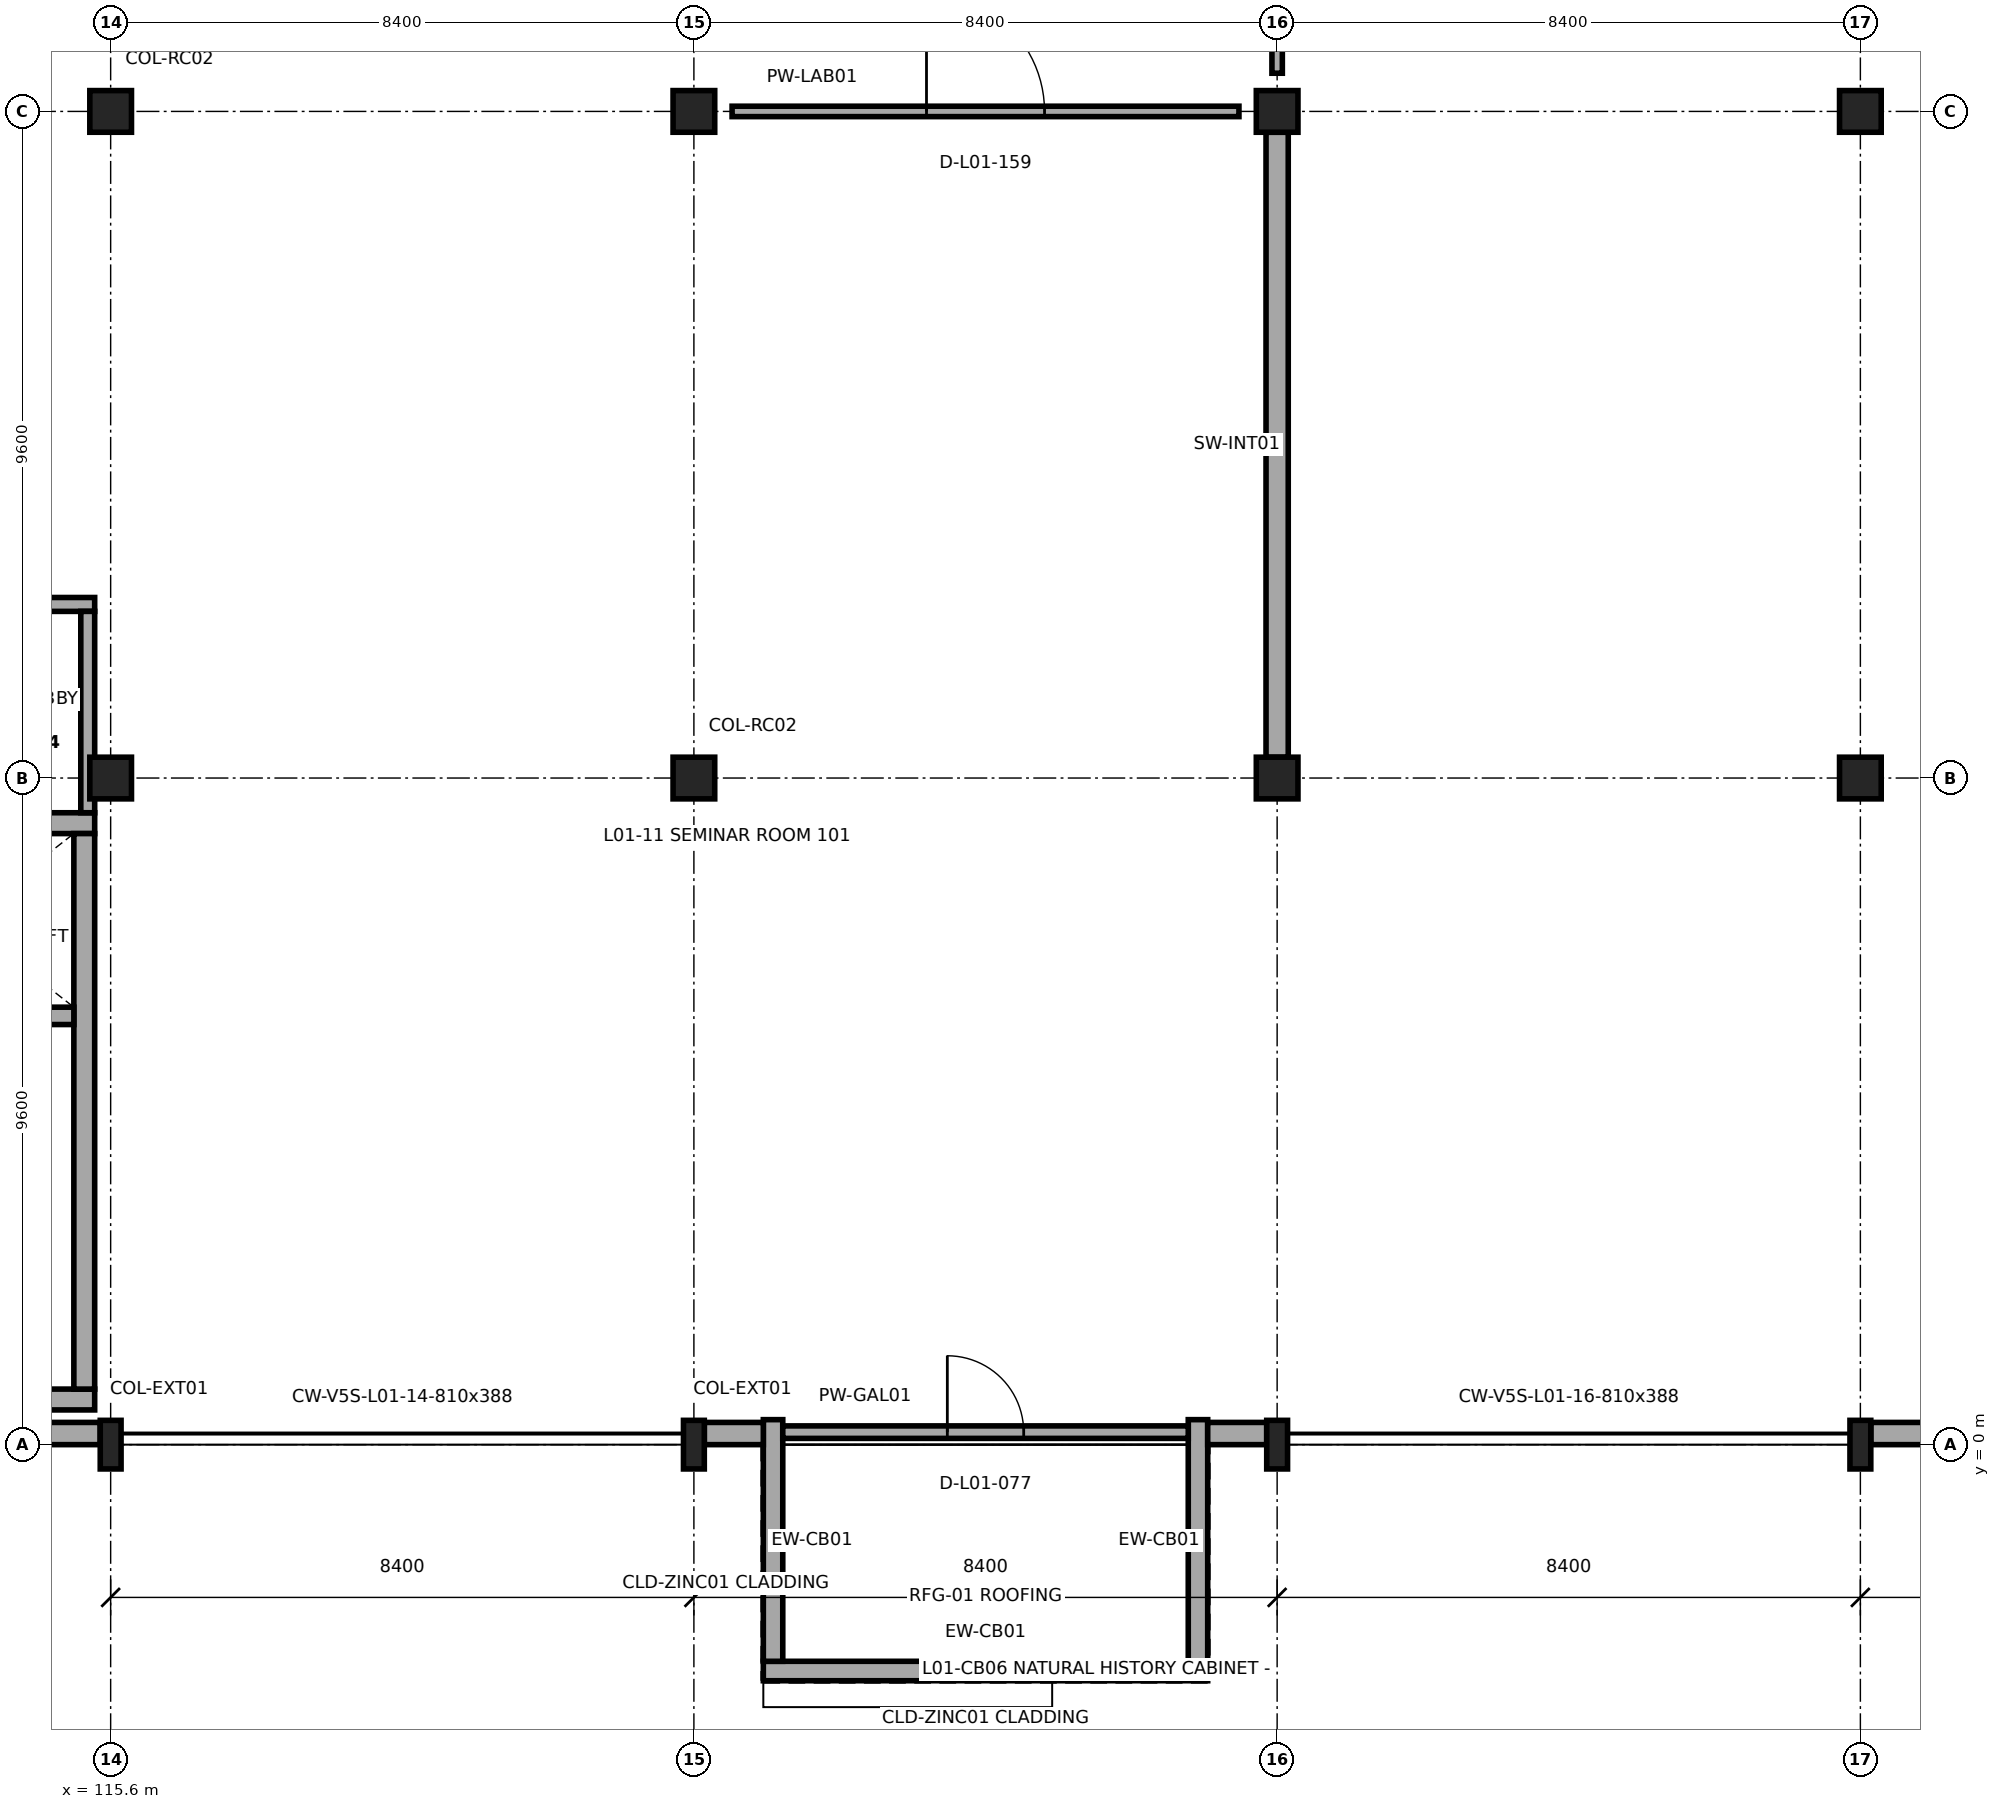
"""IFC4 building model, lengths in metres.
Left out: names, types, materials, properties, quantities, classifications, styles, units other than length and angle.
Written with IfcOpenShell. Run it as: python <this file> out.ifc"""

import sys

from ifc_helpers import new_model, si_unit, direction, frame, frame_2d, origin, origin_2d, place, context, subcontext, project, spatial, rectangle, i_section, extrude, element, fill, save


model = new_model("IFC4")
c1 = context("Model", 3, precision=1e-05, world=origin(), true_north=direction((0.0, 1.0)))
c2 = subcontext(c1, "Body", "Model", "MODEL_VIEW")
j1 = project(units=[si_unit("LENGTHUNIT", "METRE"), si_unit("PLANEANGLEUNIT", "RADIAN")], contexts=[c1])
p1 = place(None, origin())
s1 = spatial("IfcSite", under=j1, at=p1, CompositionType="ELEMENT")
p2 = place(p1, origin())
s2 = spatial("IfcBuilding", under=s1, at=p2, CompositionType="ELEMENT")
p3 = place(p2, frame((0.0, 0.0, 8.4)))
s3 = spatial("IfcBuildingStorey", under=s2, at=p3, CompositionType="ELEMENT", Elevation=8.4)
p4 = place(p3, frame((115.6, 0.0, 0.0), z_axis=(0.0, 0.0, 1.0), x_axis=(1.0, 0.0, 0.0)))
e1 = element("IfcColumn", 1, at=p4, inside=s3, PredefinedType="COLUMN", context=c2, shape_type="SweptSolid", body=[
    extrude(i_section(OverallWidth=0.3, OverallDepth=0.7, WebThickness=0.017, FlangeThickness=0.032, FilletRadius=0.027, at=origin_2d()), origin(), (0.0, 0.0, 1.0), 4.5),
])
for number, where, z_axis, x_axis in (
    (2, (115.6, 9.6, 0.0), (0.0, 0.0, 1.0), (1.0, 0.0, 0.0)),
    (3, (115.6, 19.2, 0.0), (0.0, 0.0, 1.0), (1.0, 0.0, 0.0)),
):
    element("IfcColumn", number, at=place(p3, frame(where, z_axis=z_axis, x_axis=x_axis)), inside=s3, PredefinedType="COLUMN", context=c2, shape_type="SweptSolid", body=[
        extrude(rectangle(XDim=0.6, YDim=0.6, at=origin_2d()), origin(), (0.0, 0.0, 1.0), 4.5),
    ])
p5 = place(p3, frame((124.0, 0.0, 0.0), z_axis=(0.0, 0.0, 1.0), x_axis=(1.0, 0.0, 0.0)))
e4 = element("IfcColumn", 4, at=p5, inside=s3, PredefinedType="COLUMN", context=c2, shape_type="SweptSolid", body=[
    extrude(i_section(OverallWidth=0.3, OverallDepth=0.7, WebThickness=0.017, FlangeThickness=0.032, FilletRadius=0.027, at=origin_2d()), origin(), (0.0, 0.0, 1.0), 4.5),
])
for number, where, z_axis, x_axis in (
    (5, (124.0, 9.6, 0.0), (0.0, 0.0, 1.0), (1.0, 0.0, 0.0)),
    (6, (124.0, 19.2, 0.0), (0.0, 0.0, 1.0), (1.0, 0.0, 0.0)),
):
    element("IfcColumn", number, at=place(p3, frame(where, z_axis=z_axis, x_axis=x_axis)), inside=s3, PredefinedType="COLUMN", context=c2, shape_type="SweptSolid", body=[
        extrude(rectangle(XDim=0.6, YDim=0.6, at=origin_2d()), origin(), (0.0, 0.0, 1.0), 4.5),
    ])
p6 = place(p3, frame((132.4, 0.0, 0.0), z_axis=(0.0, 0.0, 1.0), x_axis=(1.0, 0.0, 0.0)))
e7 = element("IfcColumn", 7, at=p6, inside=s3, PredefinedType="COLUMN", context=c2, shape_type="SweptSolid", body=[
    extrude(i_section(OverallWidth=0.3, OverallDepth=0.7, WebThickness=0.017, FlangeThickness=0.032, FilletRadius=0.027, at=origin_2d()), origin(), (0.0, 0.0, 1.0), 4.5),
])
for number, where, z_axis, x_axis in (
    (8, (132.4, 9.6, 0.0), (0.0, 0.0, 1.0), (1.0, 0.0, 0.0)),
    (9, (132.4, 19.2, 0.0), (0.0, 0.0, 1.0), (1.0, 0.0, 0.0)),
):
    element("IfcColumn", number, at=place(p3, frame(where, z_axis=z_axis, x_axis=x_axis)), inside=s3, PredefinedType="COLUMN", context=c2, shape_type="SweptSolid", body=[
        extrude(rectangle(XDim=0.6, YDim=0.6, at=origin_2d()), origin(), (0.0, 0.0, 1.0), 4.5),
    ])
p7 = place(p3, frame((140.8, 0.0, 0.0), z_axis=(0.0, 0.0, 1.0), x_axis=(1.0, 0.0, 0.0)))
e10 = element("IfcColumn", 10, at=p7, inside=s3, PredefinedType="COLUMN", context=c2, shape_type="SweptSolid", body=[
    extrude(i_section(OverallWidth=0.3, OverallDepth=0.7, WebThickness=0.017, FlangeThickness=0.032, FilletRadius=0.027, at=origin_2d()), origin(), (0.0, 0.0, 1.0), 4.5),
])
for number, where, z_axis, x_axis in (
    (11, (140.8, 9.6, 0.0), (0.0, 0.0, 1.0), (1.0, 0.0, 0.0)),
    (12, (140.8, 19.2, 0.0), (0.0, 0.0, 1.0), (1.0, 0.0, 0.0)),
):
    element("IfcColumn", number, at=place(p3, frame(where, z_axis=z_axis, x_axis=x_axis)), inside=s3, PredefinedType="COLUMN", context=c2, shape_type="SweptSolid", body=[
        extrude(rectangle(XDim=0.6, YDim=0.6, at=origin_2d()), origin(), (0.0, 0.0, 1.0), 4.5),
    ])
p8 = place(p3, frame((125.0, -3.26, 0.0), z_axis=(0.0, 0.0, 1.0), x_axis=(1.0, 0.0, 0.0)))
e13 = element("IfcWall", 13, at=p8, inside=s3, PredefinedType="SOLIDWALL", context=c2, shape_type="SweptSolid", body=[
    extrude(rectangle(XDim=6.4, YDim=0.28, at=frame_2d((3.2, 0.0))), origin(), (0.0, 0.0, 1.0), 2.99),
])
for number, where, z_axis, x_axis in (
    (14, (125.14, 0.36, 0.0), (0.0, 0.0, 1.0), (0.0, -1.0, 0.0)),
    (15, (131.26, -3.12, 0.0), (0.0, 0.0, 1.0), (0.0, 1.0, 0.0)),
):
    element("IfcWall", number, at=place(p3, frame(where, z_axis=z_axis, x_axis=x_axis)), inside=s3, PredefinedType="SOLIDWALL", context=c2, shape_type="SweptSolid", body=[
        extrude(rectangle(XDim=3.48, YDim=0.28, at=frame_2d((1.74, 0.0))), origin(), (0.0, 0.0, 1.0), 2.99),
    ])
p9 = place(p3, frame((107.625, 0.16, 0.0), z_axis=(0.0, 0.0, 1.0), x_axis=(1.0, 0.0, 0.0)))
e16 = element("IfcWall", 16, at=p9, inside=s3, PredefinedType="SOLIDWALL", context=c2, shape_type="SweptSolid", body=[
    extrude(rectangle(XDim=7.825, YDim=0.32, at=frame_2d((3.913, 0.0))), origin(), (0.0, 0.0, 1.0), 3.02),
])
for number, where, z_axis, x_axis in (
    (17, (124.15, 0.16, 0.0), (0.0, 0.0, 1.0), (1.0, 0.0, 0.0)),
    (18, (131.4, 0.16, 0.0), (0.0, 0.0, 1.0), (1.0, 0.0, 0.0)),
):
    element("IfcWall", number, at=place(p3, frame(where, z_axis=z_axis, x_axis=x_axis)), inside=s3, PredefinedType="SOLIDWALL", context=c2, shape_type="SweptSolid", body=[
        extrude(rectangle(XDim=0.85, YDim=0.32, at=frame_2d((0.425, 0.0))), origin(), (0.0, 0.0, 1.0), 3.88),
    ])
p10 = place(p3, frame((140.95, 0.16, 0.0), z_axis=(0.0, 0.0, 1.0), x_axis=(1.0, 0.0, 0.0)))
e19 = element("IfcWall", 19, at=p10, inside=s3, PredefinedType="SOLIDWALL", context=c2, shape_type="SweptSolid", body=[
    extrude(rectangle(XDim=8.1, YDim=0.32, at=frame_2d((4.05, 0.0))), origin(), (0.0, 0.0, 1.0), 3.88),
])
p11 = place(p10, frame((3.425, 0.0, 1.0)))
e20 = element("IfcOpeningElement", 20, at=p11, cuts=e19, PredefinedType="OPENING", context=c2, shape_type="SweptSolid", body=[
    extrude(rectangle(XDim=1.25, YDim=1.95, at=frame_2d((0.625, 0.975))), frame((0.0, 0.17, 0.0), z_axis=(0.0, -1.0, 0.0), x_axis=(1.0, 0.0, 0.0)), (0.0, 0.0, 1.0), 0.34),
])
p12 = place(p3, frame((107.43, 0.65, 0.0), z_axis=(0.0, 0.0, 1.0), x_axis=(1.0, 0.0, 0.0)))
e21 = element("IfcWall", 21, at=p12, inside=s3, PredefinedType="SHEAR", context=c2, shape_type="SweptSolid", body=[
    extrude(rectangle(XDim=7.94, YDim=0.3, at=frame_2d((3.97, 0.0))), origin(), (0.0, 0.0, 1.0), 4.25),
])
p13 = place(p3, frame((115.37, 8.95, 0.0), z_axis=(0.0, 0.0, 1.0), x_axis=(-1.0, 0.0, 0.0)))
e22 = element("IfcWall", 22, at=p13, inside=s3, PredefinedType="SHEAR", context=c2, shape_type="SweptSolid", body=[
    extrude(rectangle(XDim=7.94, YDim=0.3, at=frame_2d((3.97, 0.0))), origin(), (0.0, 0.0, 1.0), 4.25),
])
p14 = place(p13, frame((5.17, 0.0, 0.0)))
e23 = element("IfcOpeningElement", 23, at=p14, cuts=e22, PredefinedType="OPENING", context=c2, shape_type="SweptSolid", body=[
    extrude(rectangle(XDim=1.1, YDim=2.2, at=frame_2d((0.55, 1.1))), frame((0.0, 0.16, 0.0), z_axis=(0.0, -1.0, 0.0), x_axis=(1.0, 0.0, 0.0)), (0.0, 0.0, 1.0), 0.32),
])
p15 = place(p13, frame((1.35, 0.0, 0.0)))
e24 = element("IfcOpeningElement", 24, at=p15, cuts=e22, PredefinedType="OPENING", context=c2, shape_type="SweptSolid", body=[
    extrude(rectangle(XDim=1.1, YDim=2.1, at=frame_2d((0.55, 1.05))), frame((0.0, 0.16, 0.0), z_axis=(0.0, -1.0, 0.0), x_axis=(1.0, 0.0, 0.0)), (0.0, 0.0, 1.0), 0.32),
])
p16 = place(p3, frame((115.22, 0.8, 0.0), z_axis=(0.0, 0.0, 1.0), x_axis=(0.0, 1.0, 0.0)))
e25 = element("IfcWall", 25, at=p16, inside=s3, PredefinedType="SHEAR", context=c2, shape_type="SweptSolid", body=[
    extrude(rectangle(XDim=8.0, YDim=0.3, at=frame_2d((4.0, 0.0))), origin(), (0.0, 0.0, 1.0), 4.25),
])
p17 = place(p3, frame((111.87, 6.175, 0.0), z_axis=(0.0, 0.0, 1.0), x_axis=(1.0, 0.0, 0.0)))
e26 = element("IfcWall", 26, at=p17, inside=s3, PredefinedType="SHEAR", context=c2, shape_type="SweptSolid", body=[
    extrude(rectangle(XDim=3.2, YDim=0.25, at=frame_2d((1.6, 0.0))), origin(), (0.0, 0.0, 1.0), 4.25),
])
p18 = place(p3, frame((107.43, 12.1, 0.0), z_axis=(0.0, 0.0, 1.0), x_axis=(1.0, 0.0, 0.0)))
e27 = element("IfcWall", 27, at=p18, inside=s3, PredefinedType="SOLIDWALL", context=c2, shape_type="SweptSolid", body=[
    extrude(rectangle(XDim=7.94, YDim=0.2, at=frame_2d((3.97, 0.0))), origin(), (0.0, 0.0, 1.0), 3.682),
])
p19 = place(p18, frame((3.07, 0.0, 0.0)))
e28 = element("IfcOpeningElement", 28, at=p19, cuts=e27, PredefinedType="OPENING", context=c2, shape_type="SweptSolid", body=[
    extrude(rectangle(XDim=1.8, YDim=2.2, at=frame_2d((0.9, 1.1))), frame((0.0, 0.11, 0.0), z_axis=(0.0, -1.0, 0.0), x_axis=(1.0, 0.0, 0.0)), (0.0, 0.0, 1.0), 0.22),
])
p20 = place(p3, frame((115.27, 12.0, 0.0), z_axis=(0.0, 0.0, 1.0), x_axis=(0.0, -1.0, 0.0)))
e29 = element("IfcWall", 29, at=p20, inside=s3, PredefinedType="SOLIDWALL", context=c2, shape_type="SweptSolid", body=[
    extrude(rectangle(XDim=2.9, YDim=0.2, at=frame_2d((1.45, 0.0))), origin(), (0.0, 0.0, 1.0), 3.682),
])
p21 = place(p3, frame((132.4, 9.9, 0.0), z_axis=(0.0, 0.0, 1.0), x_axis=(0.0, 1.0, 0.0)))
e30 = element("IfcWall", 30, at=p21, inside=s3, PredefinedType="SHEAR", context=c2, shape_type="SweptSolid", body=[
    extrude(rectangle(XDim=9.0, YDim=0.32, at=frame_2d((4.5, 0.0))), origin(), (0.0, 0.0, 1.0), 4.25),
])
p22 = place(p3, frame((125.28, 0.18, 0.0), z_axis=(0.0, 0.0, 1.0), x_axis=(1.0, 0.0, 0.0)))
e31 = element("IfcWall", 31, at=p22, inside=s3, PredefinedType="PARTITIONING", context=c2, shape_type="SweptSolid", body=[
    extrude(rectangle(XDim=5.84, YDim=0.18, at=frame_2d((2.92, 0.0))), origin(), (0.0, 0.0, 1.0), 2.99),
])
p23 = place(p22, frame((2.37, 0.0, 0.0)))
e32 = element("IfcOpeningElement", 32, at=p23, cuts=e31, PredefinedType="OPENING", context=c2, shape_type="SweptSolid", body=[
    extrude(rectangle(XDim=1.1, YDim=2.2, at=frame_2d((0.55, 1.1))), frame((0.0, 0.1, 0.0), z_axis=(0.0, -1.0, 0.0), x_axis=(1.0, 0.0, 0.0)), (0.0, 0.0, 1.0), 0.2),
])
p24 = place(p3, frame((124.55, 19.2, 0.0), z_axis=(0.0, 0.0, 1.0), x_axis=(1.0, 0.0, 0.0)))
e33 = element("IfcWall", 33, at=p24, inside=s3, PredefinedType="PARTITIONING", context=c2, shape_type="SweptSolid", body=[
    extrude(rectangle(XDim=7.3, YDim=0.15, at=frame_2d((3.65, 0.0))), origin(), (0.0, 0.0, 1.0), 3.682),
])
p25 = place(p24, frame((2.8, 0.0, 0.0)))
e34 = element("IfcOpeningElement", 34, at=p25, cuts=e33, PredefinedType="OPENING", context=c2, shape_type="SweptSolid", body=[
    extrude(rectangle(XDim=1.7, YDim=2.35, at=frame_2d((0.85, 1.175))), frame((0.0, 0.085, 0.0), z_axis=(0.0, -1.0, 0.0), x_axis=(1.0, 0.0, 0.0)), (0.0, 0.0, 1.0), 0.17),
])
p26 = place(p3, frame((132.4, 19.75, 0.0), z_axis=(0.0, 0.0, 1.0), x_axis=(0.0, 1.0, 0.0)))
e35 = element("IfcWall", 35, at=p26, inside=s3, PredefinedType="PARTITIONING", context=c2, shape_type="SweptSolid", body=[
    extrude(rectangle(XDim=6.1, YDim=0.15, at=frame_2d((3.05, 0.0))), origin(), (0.0, 0.0, 1.0), 3.682),
])
p27 = place(p26, frame((2.425, 0.0, 0.0)))
e36 = element("IfcOpeningElement", 36, at=p27, cuts=e35, PredefinedType="OPENING", context=c2, shape_type="SweptSolid", body=[
    extrude(rectangle(XDim=1.25, YDim=2.2, at=frame_2d((0.625, 1.1))), frame((0.0, 0.085, 0.0), z_axis=(0.0, -1.0, 0.0), x_axis=(1.0, 0.0, 0.0)), (0.0, 0.0, 1.0), 0.17),
])
p28 = place(p23, origin())
e37 = element("IfcDoor", 37, at=p28, inside=s3, OperationType="SINGLE_SWING_LEFT", PredefinedType="DOOR", context=c2, shape_type="SweptSolid", body=[
    extrude(rectangle(XDim=1.1, YDim=2.2, at=frame_2d((0.55, 1.1))), frame((0.0, 0.025, 0.0), z_axis=(0.0, -1.0, 0.0), x_axis=(1.0, 0.0, 0.0)), (0.0, 0.0, 1.0), 0.05),
])
fill(e32, e37)
p29 = place(p25, origin())
e38 = element("IfcDoor", 38, at=p29, inside=s3, OperationType="DOUBLE_DOOR_SINGLE_SWING", PredefinedType="DOOR", context=c2, shape_type="SweptSolid", body=[
    extrude(rectangle(XDim=1.7, YDim=2.35, at=frame_2d((0.85, 1.175))), frame((0.0, 0.025, 0.0), z_axis=(0.0, -1.0, 0.0), x_axis=(1.0, 0.0, 0.0)), (0.0, 0.0, 1.0), 0.05),
])
fill(e34, e38)
save(model, sys.argv[1])
